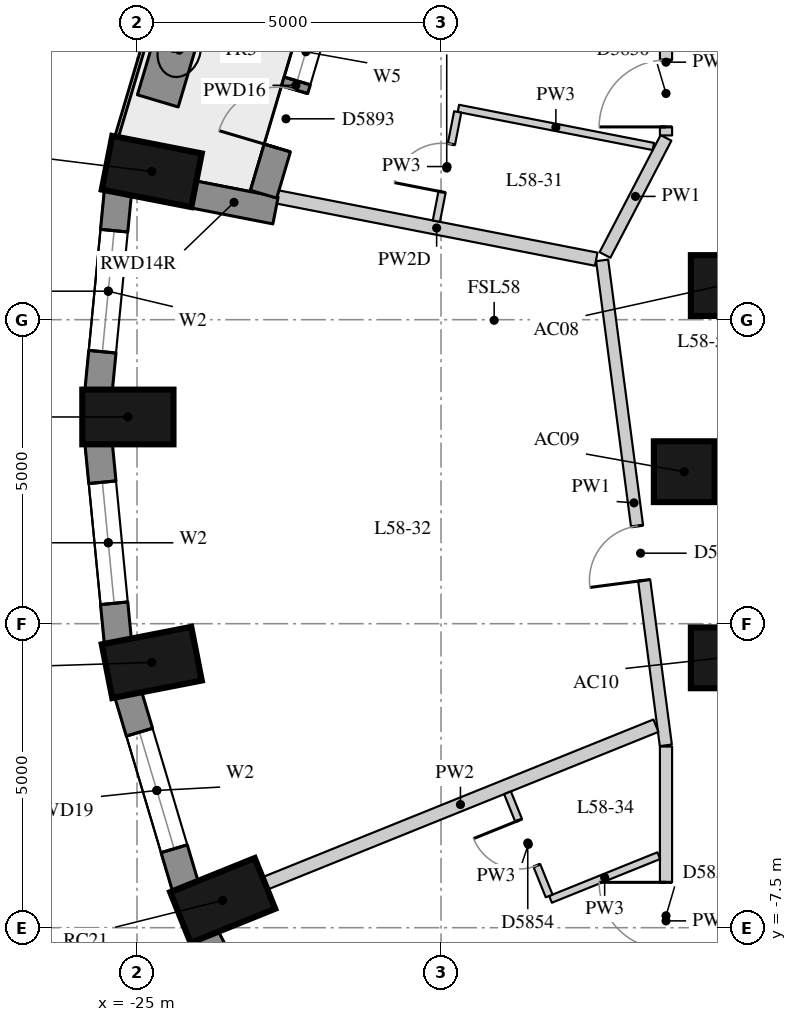
"""IFC4 building model, lengths in metres.
Left out: names, types, materials, properties, quantities, classifications, styles, units other than length and angle.
Written with IfcOpenShell. Run it as: python <this file> out.ifc"""

import sys

from ifc_helpers import new_model, si_unit, direction, frame, frame_2d, origin, origin_2d, place, context, subcontext, project, spatial, rectangle, extrude, element, fill, save


model = new_model("IFC4")
c1 = context("Model", 3, precision=1e-05, world=origin(), true_north=direction((0.0, 1.0)))
c2 = subcontext(c1, "Body", "Model", "MODEL_VIEW")
j1 = project(units=[si_unit("LENGTHUNIT", "METRE"), si_unit("PLANEANGLEUNIT", "RADIAN")], contexts=[c1])
p1 = place(None, origin())
s1 = spatial("IfcSite", under=j1, at=p1, CompositionType="ELEMENT")
p2 = place(p1, origin())
s2 = spatial("IfcBuilding", under=s1, at=p2, CompositionType="ELEMENT")
p3 = place(p2, frame((0.0, 0.0, 205.7)))
s3 = spatial("IfcBuildingStorey", under=s2, at=p3, CompositionType="ELEMENT", Elevation=205.7)
for number, where, z_axis, x_axis in (
    (1, (-24.757, 4.937, 0.0), (0.0, 0.0, 1.0), (-0.981, 0.192, 0.0)),
    (2, (-25.15, 0.9, 0.0), (0.0, 0.0, 1.0), (-1.0, 0.0, 0.0)),
    (3, (-24.757, -3.137, 0.0), (0.0, 0.0, 1.0), (-0.981, -0.192, 0.0)),
    (4, (-23.591, -7.052, 0.0), (0.0, 0.0, 1.0), (-0.927, -0.374, 0.0)),
):
    element("IfcColumn", number, at=place(p3, frame(where, z_axis=z_axis, x_axis=x_axis)), inside=s3, PredefinedType="COLUMN", context=c2, shape_type="SweptSolid", body=[
        extrude(rectangle(XDim=1.5, YDim=0.9, at=origin_2d()), origin(), (0.0, 0.0, 1.0), 3.3),
    ])
for number, where, z_axis, x_axis in (
    (5, (-15.391, 3.062, 0.0), (0.0, 0.0, 1.0), (1.0, 0.0, 0.0)),
    (6, (-16.0, 0.0, 0.0), (0.0, 0.0, 1.0), (1.0, 0.0, 0.0)),
    (7, (-15.391, -3.062, 0.0), (0.0, 0.0, 1.0), (1.0, 0.0, 0.0)),
):
    element("IfcColumn", number, at=place(p3, frame(where, z_axis=z_axis, x_axis=x_axis)), inside=s3, PredefinedType="COLUMN", context=c2, shape_type="SweptSolid", body=[
        extrude(rectangle(XDim=1.0, YDim=1.0, at=origin_2d()), origin(), (0.0, 0.0, 1.0), 3.3),
    ])
p4 = place(p3, frame((-25.313, 4.608, 0.0), z_axis=(0.0, 0.0, 1.0), x_axis=(-0.096824116835, -0.995301507283, 0.0)))
e8 = element("IfcWall", 8, at=p4, inside=s3, PredefinedType="SOLIDWALL", context=c2, shape_type="SweptSolid", body=[
    extrude(rectangle(XDim=3.293, YDim=0.45, at=frame_2d((1.646, 0.0))), origin(), (0.0, 0.0, 1.0), 3.02),
])
p5 = place(p4, frame((0.646, 0.0, 0.4)))
e9 = element("IfcOpeningElement", 9, at=p5, cuts=e8, PredefinedType="OPENING", context=c2, shape_type="SweptSolid", body=[
    extrude(rectangle(XDim=2.0, YDim=1.75, at=frame_2d((1.0, 0.875))), frame((0.0, 0.235, 0.0), z_axis=(0.0, -1.0, 0.0), x_axis=(1.0, 0.0, 0.0)), (0.0, 0.0, 1.0), 0.47),
])
p6 = place(p3, frame((-25.632, 0.47, 0.0), z_axis=(0.0, 0.0, 1.0), x_axis=(0.096816972749, -0.995302202242, 0.0)))
e10 = element("IfcWall", 10, at=p6, inside=s3, PredefinedType="SOLIDWALL", context=c2, shape_type="SweptSolid", body=[
    extrude(rectangle(XDim=3.293, YDim=0.45, at=frame_2d((1.646, 0.0))), origin(), (0.0, 0.0, 1.0), 3.02),
])
p7 = place(p6, frame((0.646, 0.0, 0.4)))
e11 = element("IfcOpeningElement", 11, at=p7, cuts=e10, PredefinedType="OPENING", context=c2, shape_type="SweptSolid", body=[
    extrude(rectangle(XDim=2.0, YDim=1.75, at=frame_2d((1.0, 0.875))), frame((0.0, 0.235, 0.0), z_axis=(0.0, -1.0, 0.0), x_axis=(1.0, 0.0, 0.0)), (0.0, 0.0, 1.0), 0.47),
])
p8 = place(p3, frame((-25.148, -3.652, 0.0), z_axis=(0.0, 0.0, 1.0), x_axis=(0.285444972963, -0.958395099847, 0.0)))
e12 = element("IfcWall", 12, at=p8, inside=s3, PredefinedType="SOLIDWALL", context=c2, shape_type="SweptSolid", body=[
    extrude(rectangle(XDim=3.32, YDim=0.45, at=frame_2d((1.66, 0.0))), origin(), (0.0, 0.0, 1.0), 3.02),
])
p9 = place(p8, frame((0.66, 0.0, 0.4)))
e13 = element("IfcOpeningElement", 13, at=p9, cuts=e12, PredefinedType="OPENING", context=c2, shape_type="SweptSolid", body=[
    extrude(rectangle(XDim=2.0, YDim=1.75, at=frame_2d((1.0, 0.875))), frame((0.0, 0.235, 0.0), z_axis=(0.0, -1.0, 0.0), x_axis=(1.0, 0.0, 0.0)), (0.0, 0.0, 1.0), 0.47),
])
p10 = place(p3, frame((-23.878, -7.632, 0.0), z_axis=(0.0, 0.0, 1.0), x_axis=(0.460232593174, -0.887798378113, 0.0)))
e14 = element("IfcWall", 14, at=p10, inside=s3, PredefinedType="SOLIDWALL", context=c2, shape_type="SweptSolid", body=[
    extrude(rectangle(XDim=3.371, YDim=0.45, at=frame_2d((1.685, 0.0))), origin(), (0.0, 0.0, 1.0), 3.02),
])
p11 = place(p10, frame((0.685, 0.0, 0.4)))
e15 = element("IfcOpeningElement", 15, at=p11, cuts=e14, PredefinedType="OPENING", context=c2, shape_type="SweptSolid", body=[
    extrude(rectangle(XDim=2.0, YDim=1.75, at=frame_2d((1.0, 0.875))), frame((0.0, 0.235, 0.0), z_axis=(0.0, -1.0, 0.0), x_axis=(1.0, 0.0, 0.0)), (0.0, 0.0, 1.0), 0.47),
])
p12 = place(p3, frame((-24.087, 4.563, 0.0), z_axis=(0.0, 0.0, 1.0), x_axis=(0.98143579878, -0.191790961394, 0.0)))
e16 = element("IfcWall", 16, at=p12, inside=s3, PredefinedType="SOLIDWALL", context=c2, shape_type="SweptSolid", body=[
    extrude(rectangle(XDim=1.39, YDim=0.45, at=frame_2d((0.695, 0.0))), origin(), (0.0, 0.0, 1.0), 2.47),
])
p13 = place(p3, frame((-21.854, 8.146, 0.0), z_axis=(0.0, 0.0, 1.0), x_axis=(-0.284757753004, -0.958599510799, 0.0)))
e17 = element("IfcWall", 17, at=p13, inside=s3, PredefinedType="SOLIDWALL", context=c2, shape_type="SweptSolid", body=[
    extrude(rectangle(XDim=3.737, YDim=0.45, at=frame_2d((1.869, 0.0))), origin(), (0.0, 0.0, 1.0), 3.02),
])
p14 = place(p13, frame((0.794, 0.0, 0.4)))
e18 = element("IfcOpeningElement", 18, at=p14, cuts=e17, PredefinedType="OPENING", context=c2, shape_type="SweptSolid", body=[
    extrude(rectangle(XDim=1.0, YDim=1.75, at=frame_2d((0.5, 0.875))), frame((0.0, 0.235, 0.0), z_axis=(0.0, -1.0, 0.0), x_axis=(1.0, 0.0, 0.0)), (0.0, 0.0, 1.0), 0.47),
])
p15 = place(p13, frame((1.944, 0.0, 0.0)))
e19 = element("IfcOpeningElement", 19, at=p15, cuts=e17, PredefinedType="OPENING", context=c2, shape_type="SweptSolid", body=[
    extrude(rectangle(XDim=1.0, YDim=2.15, at=frame_2d((0.5, 1.075))), frame((0.0, 0.235, 0.0), z_axis=(0.0, -1.0, 0.0), x_axis=(1.0, 0.0, 0.0)), (0.0, 0.0, 1.0), 0.47),
])
p16 = place(p3, frame((-24.144, 7.824, 0.0), z_axis=(0.0, 0.0, 1.0), x_axis=(-0.285505743157, -0.958376998171, 0.0)))
e20 = element("IfcWall", 20, at=p16, inside=s3, PredefinedType="USERDEFINED", context=c2, shape_type="SweptSolid", body=[
    extrude(rectangle(XDim=1.8, YDim=0.7, at=frame_2d((0.9, 0.0))), origin(), (0.0, 0.0, 1.0), 0.75),
])
p17 = place(p3, frame((-16.3, -10.255, 0.0), z_axis=(0.0, 0.0, 1.0), x_axis=(0.0, 1.0, 0.0)))
e21 = element("IfcWall", 21, at=p17, inside=s3, PredefinedType="PARTITIONING", context=c2, shape_type="SweptSolid", body=[
    extrude(rectangle(XDim=5.734, YDim=0.2, at=frame_2d((2.867, 0.0))), origin(), (0.0, 0.0, 1.0), 3.02),
])
p18 = place(p17, frame((2.401, 0.0, 0.0)))
e22 = element("IfcOpeningElement", 22, at=p18, cuts=e21, PredefinedType="OPENING", context=c2, shape_type="SweptSolid", body=[
    extrude(rectangle(XDim=1.1, YDim=2.1, at=frame_2d((0.55, 1.05))), frame((0.0, 0.11, 0.0), z_axis=(0.0, -1.0, 0.0), x_axis=(1.0, 0.0, 0.0)), (0.0, 0.0, 1.0), 0.22),
])
p19 = place(p3, frame((-16.303, -4.501, 0.0), z_axis=(0.0, 0.0, 1.0), x_axis=(-0.130191522351, 0.991488864036, 0.0)))
e23 = element("IfcWall", 23, at=p19, inside=s3, PredefinedType="PARTITIONING", context=c2, shape_type="SweptSolid", body=[
    extrude(rectangle(XDim=8.045, YDim=0.2, at=frame_2d((4.022, 0.0))), origin(), (0.0, 0.0, 1.0), 3.02),
])
p20 = place(p19, frame((2.738, 0.0, 0.0)))
e24 = element("IfcOpeningElement", 24, at=p20, cuts=e23, PredefinedType="OPENING", context=c2, shape_type="SweptSolid", body=[
    extrude(rectangle(XDim=0.9, YDim=2.1, at=frame_2d((0.45, 1.05))), frame((0.0, 0.11, 0.0), z_axis=(0.0, -1.0, 0.0), x_axis=(1.0, 0.0, 0.0)), (0.0, 0.0, 1.0), 0.22),
])
p21 = place(p3, frame((-17.304, 3.565, 0.0), z_axis=(0.0, 0.0, 1.0), x_axis=(0.46212415324, 0.886815238363, 0.0)))
e25 = element("IfcWall", 25, at=p21, inside=s3, PredefinedType="PARTITIONING", context=c2, shape_type="SweptSolid", body=[
    extrude(rectangle(XDim=2.172, YDim=0.2, at=frame_2d((1.086, 0.0))), origin(), (0.0, 0.0, 1.0), 3.02),
])
p22 = place(p3, frame((-16.3, 5.531, 0.0), z_axis=(0.0, 0.0, 1.0), x_axis=(0.0, 1.0, 0.0)))
e26 = element("IfcWall", 26, at=p22, inside=s3, PredefinedType="PARTITIONING", context=c2, shape_type="SweptSolid", body=[
    extrude(rectangle(XDim=2.409, YDim=0.2, at=frame_2d((1.205, 0.0))), origin(), (0.0, 0.0, 1.0), 3.02),
])
p23 = place(p22, frame((0.14, 0.0, 0.0)))
e27 = element("IfcOpeningElement", 27, at=p23, cuts=e26, PredefinedType="OPENING", context=c2, shape_type="SweptSolid", body=[
    extrude(rectangle(XDim=1.1, YDim=2.1, at=frame_2d((0.55, 1.05))), frame((0.0, 0.11, 0.0), z_axis=(0.0, -1.0, 0.0), x_axis=(1.0, 0.0, 0.0)), (0.0, 0.0, 1.0), 0.22),
])
p24 = place(p3, frame((-22.697, 4.521, 0.0), z_axis=(0.0, 0.0, 1.0), x_axis=(0.981448712972, -0.19172486486, 0.0)))
e28 = element("IfcWall", 28, at=p24, inside=s3, PredefinedType="PARTITIONING", context=c2, shape_type="SweptSolid", body=[
    extrude(rectangle(XDim=5.348, YDim=0.22, at=frame_2d((2.674, 0.0))), origin(), (0.0, 0.0, 1.0), 2.47),
])
p25 = place(p3, frame((-22.896, -6.771, 0.0), z_axis=(0.0, 0.0, 1.0), x_axis=(0.927377440276, 0.374127095073, 0.0)))
e29 = element("IfcWall", 29, at=p25, inside=s3, PredefinedType="PARTITIONING", context=c2, shape_type="SweptSolid", body=[
    extrude(rectangle(XDim=6.933, YDim=0.22, at=frame_2d((3.467, 0.0))), origin(), (0.0, 0.0, 1.0), 3.02),
])
p26 = place(p3, frame((-16.508, 5.349, 0.0), z_axis=(0.0, 0.0, 1.0), x_axis=(-0.981441910277, 0.191759684898, 0.0)))
e30 = element("IfcWall", 30, at=p26, inside=s3, PredefinedType="PARTITIONING", context=c2, shape_type="SweptSolid", body=[
    extrude(rectangle(XDim=3.267, YDim=0.12, at=frame_2d((1.633, 0.0))), origin(), (0.0, 0.0, 1.0), 3.02),
])
p27 = place(p3, frame((-16.419, -6.315, 0.0), z_axis=(0.0, 0.0, 1.0), x_axis=(-0.927358946461, -0.374172933841, 0.0)))
e31 = element("IfcWall", 31, at=p27, inside=s3, PredefinedType="PARTITIONING", context=c2, shape_type="SweptSolid", body=[
    extrude(rectangle(XDim=1.92, YDim=0.12, at=frame_2d((0.96, 0.0))), origin(), (0.0, 0.0, 1.0), 3.02),
])
p28 = place(p3, frame((-19.726, 5.917, 0.0), z_axis=(0.0, 0.0, 1.0), x_axis=(-0.191830051998, -0.981428158935, 0.0)))
e32 = element("IfcWall", 32, at=p28, inside=s3, PredefinedType="PARTITIONING", context=c2, shape_type="SweptSolid", body=[
    extrude(rectangle(XDim=1.83, YDim=0.12, at=frame_2d((0.915, 0.0))), origin(), (0.0, 0.0, 1.0), 3.02),
])
p29 = place(p28, frame((0.54, 0.0, 0.0)))
e33 = element("IfcOpeningElement", 33, at=p29, cuts=e32, PredefinedType="OPENING", context=c2, shape_type="SweptSolid", body=[
    extrude(rectangle(XDim=0.8, YDim=2.1, at=frame_2d((0.4, 1.05))), frame((0.0, 0.07, 0.0), z_axis=(0.0, -1.0, 0.0), x_axis=(1.0, 0.0, 0.0)), (0.0, 0.0, 1.0), 0.14),
])
p30 = place(p3, frame((-18.222, -6.978, 0.0), z_axis=(0.0, 0.0, 1.0), x_axis=(-0.374218187905, 0.927340685963, 0.0)))
e34 = element("IfcWall", 34, at=p30, inside=s3, PredefinedType="PARTITIONING", context=c2, shape_type="SweptSolid", body=[
    extrude(rectangle(XDim=1.83, YDim=0.12, at=frame_2d((0.915, 0.0))), origin(), (0.0, 0.0, 1.0), 3.02),
])
p31 = place(p30, frame((0.54, 0.0, 0.0)))
e35 = element("IfcOpeningElement", 35, at=p31, cuts=e34, PredefinedType="OPENING", context=c2, shape_type="SweptSolid", body=[
    extrude(rectangle(XDim=0.8, YDim=2.1, at=frame_2d((0.4, 1.05))), frame((0.0, 0.07, 0.0), z_axis=(0.0, -1.0, 0.0), x_axis=(1.0, 0.0, 0.0)), (0.0, 0.0, 1.0), 0.14),
])
p32 = place(p5, origin())
e36 = element("IfcWindow", 36, at=p32, inside=s3, PartitioningType="SINGLE_PANEL", PredefinedType="WINDOW", context=c2, shape_type="SweptSolid", body=[
    extrude(rectangle(XDim=2.0, YDim=1.75, at=frame_2d((1.0, 0.875))), frame((0.0, 0.035, 0.0), z_axis=(0.0, -1.0, 0.0), x_axis=(1.0, 0.0, 0.0)), (0.0, 0.0, 1.0), 0.06),
])
fill(e9, e36)
p33 = place(p7, origin())
e37 = element("IfcWindow", 37, at=p33, inside=s3, PartitioningType="SINGLE_PANEL", PredefinedType="WINDOW", context=c2, shape_type="SweptSolid", body=[
    extrude(rectangle(XDim=2.0, YDim=1.75, at=frame_2d((1.0, 0.875))), frame((0.0, 0.035, 0.0), z_axis=(0.0, -1.0, 0.0), x_axis=(1.0, 0.0, 0.0)), (0.0, 0.0, 1.0), 0.06),
])
fill(e11, e37)
p34 = place(p9, origin())
e38 = element("IfcWindow", 38, at=p34, inside=s3, PartitioningType="SINGLE_PANEL", PredefinedType="WINDOW", context=c2, shape_type="SweptSolid", body=[
    extrude(rectangle(XDim=2.0, YDim=1.75, at=frame_2d((1.0, 0.875))), frame((0.0, 0.035, 0.0), z_axis=(0.0, -1.0, 0.0), x_axis=(1.0, 0.0, 0.0)), (0.0, 0.0, 1.0), 0.06),
])
fill(e13, e38)
p35 = place(p14, origin())
e39 = element("IfcWindow", 39, at=p35, inside=s3, PartitioningType="SINGLE_PANEL", PredefinedType="WINDOW", context=c2, shape_type="SweptSolid", body=[
    extrude(rectangle(XDim=1.0, YDim=1.75, at=frame_2d((0.5, 0.875))), frame((0.0, 0.035, 0.0), z_axis=(0.0, -1.0, 0.0), x_axis=(1.0, 0.0, 0.0)), (0.0, 0.0, 1.0), 0.06),
])
fill(e18, e39)
p36 = place(p15, frame((1.0, 0.0, 0.0), z_axis=(0.0, 0.0, 1.0), x_axis=(-1.0, 0.0, 0.0)))
e40 = element("IfcDoor", 40, at=p36, inside=s3, OperationType="SINGLE_SWING_LEFT", PredefinedType="DOOR", context=c2, shape_type="SweptSolid", body=[
    extrude(rectangle(XDim=1.0, YDim=2.15, at=frame_2d((0.5, 1.075))), frame((0.0, 0.075, 0.0), z_axis=(0.0, -1.0, 0.0), x_axis=(1.0, 0.0, 0.0)), (0.0, 0.0, 1.0), 0.05),
])
fill(e19, e40)
p37 = place(p23, origin())
e41 = element("IfcDoor", 41, at=p37, inside=s3, OperationType="SINGLE_SWING_LEFT", PredefinedType="DOOR", context=c2, shape_type="SweptSolid", body=[
    extrude(rectangle(XDim=1.1, YDim=2.1, at=frame_2d((0.55, 1.05))), frame((0.0, 0.025, 0.0), z_axis=(0.0, -1.0, 0.0), x_axis=(1.0, 0.0, 0.0)), (0.0, 0.0, 1.0), 0.05),
])
fill(e27, e41)
p38 = place(p29, origin())
e42 = element("IfcDoor", 42, at=p38, inside=s3, OperationType="SINGLE_SWING_LEFT", PredefinedType="DOOR", context=c2, shape_type="SweptSolid", body=[
    extrude(rectangle(XDim=0.8, YDim=2.1, at=frame_2d((0.4, 1.05))), frame((0.0, 0.025, 0.0), z_axis=(0.0, -1.0, 0.0), x_axis=(1.0, 0.0, 0.0)), (0.0, 0.0, 1.0), 0.05),
])
fill(e33, e42)
p39 = place(p20, origin())
e43 = element("IfcDoor", 43, at=p39, inside=s3, OperationType="SINGLE_SWING_LEFT", PredefinedType="DOOR", context=c2, shape_type="SweptSolid", body=[
    extrude(rectangle(XDim=0.9, YDim=2.1, at=frame_2d((0.45, 1.05))), frame((0.0, 0.025, 0.0), z_axis=(0.0, -1.0, 0.0), x_axis=(1.0, 0.0, 0.0)), (0.0, 0.0, 1.0), 0.05),
])
fill(e24, e43)
p40 = place(p18, origin())
e44 = element("IfcDoor", 44, at=p40, inside=s3, OperationType="SINGLE_SWING_RIGHT", PredefinedType="DOOR", context=c2, shape_type="SweptSolid", body=[
    extrude(rectangle(XDim=1.1, YDim=2.1, at=frame_2d((0.55, 1.05))), frame((0.0, 0.025, 0.0), z_axis=(0.0, -1.0, 0.0), x_axis=(1.0, 0.0, 0.0)), (0.0, 0.0, 1.0), 0.05),
])
fill(e22, e44)
p41 = place(p31, origin())
e45 = element("IfcDoor", 45, at=p41, inside=s3, OperationType="SINGLE_SWING_RIGHT", PredefinedType="DOOR", context=c2, shape_type="SweptSolid", body=[
    extrude(rectangle(XDim=0.8, YDim=2.1, at=frame_2d((0.4, 1.05))), frame((0.0, 0.025, 0.0), z_axis=(0.0, -1.0, 0.0), x_axis=(1.0, 0.0, 0.0)), (0.0, 0.0, 1.0), 0.05),
])
fill(e35, e45)
save(model, sys.argv[1])
